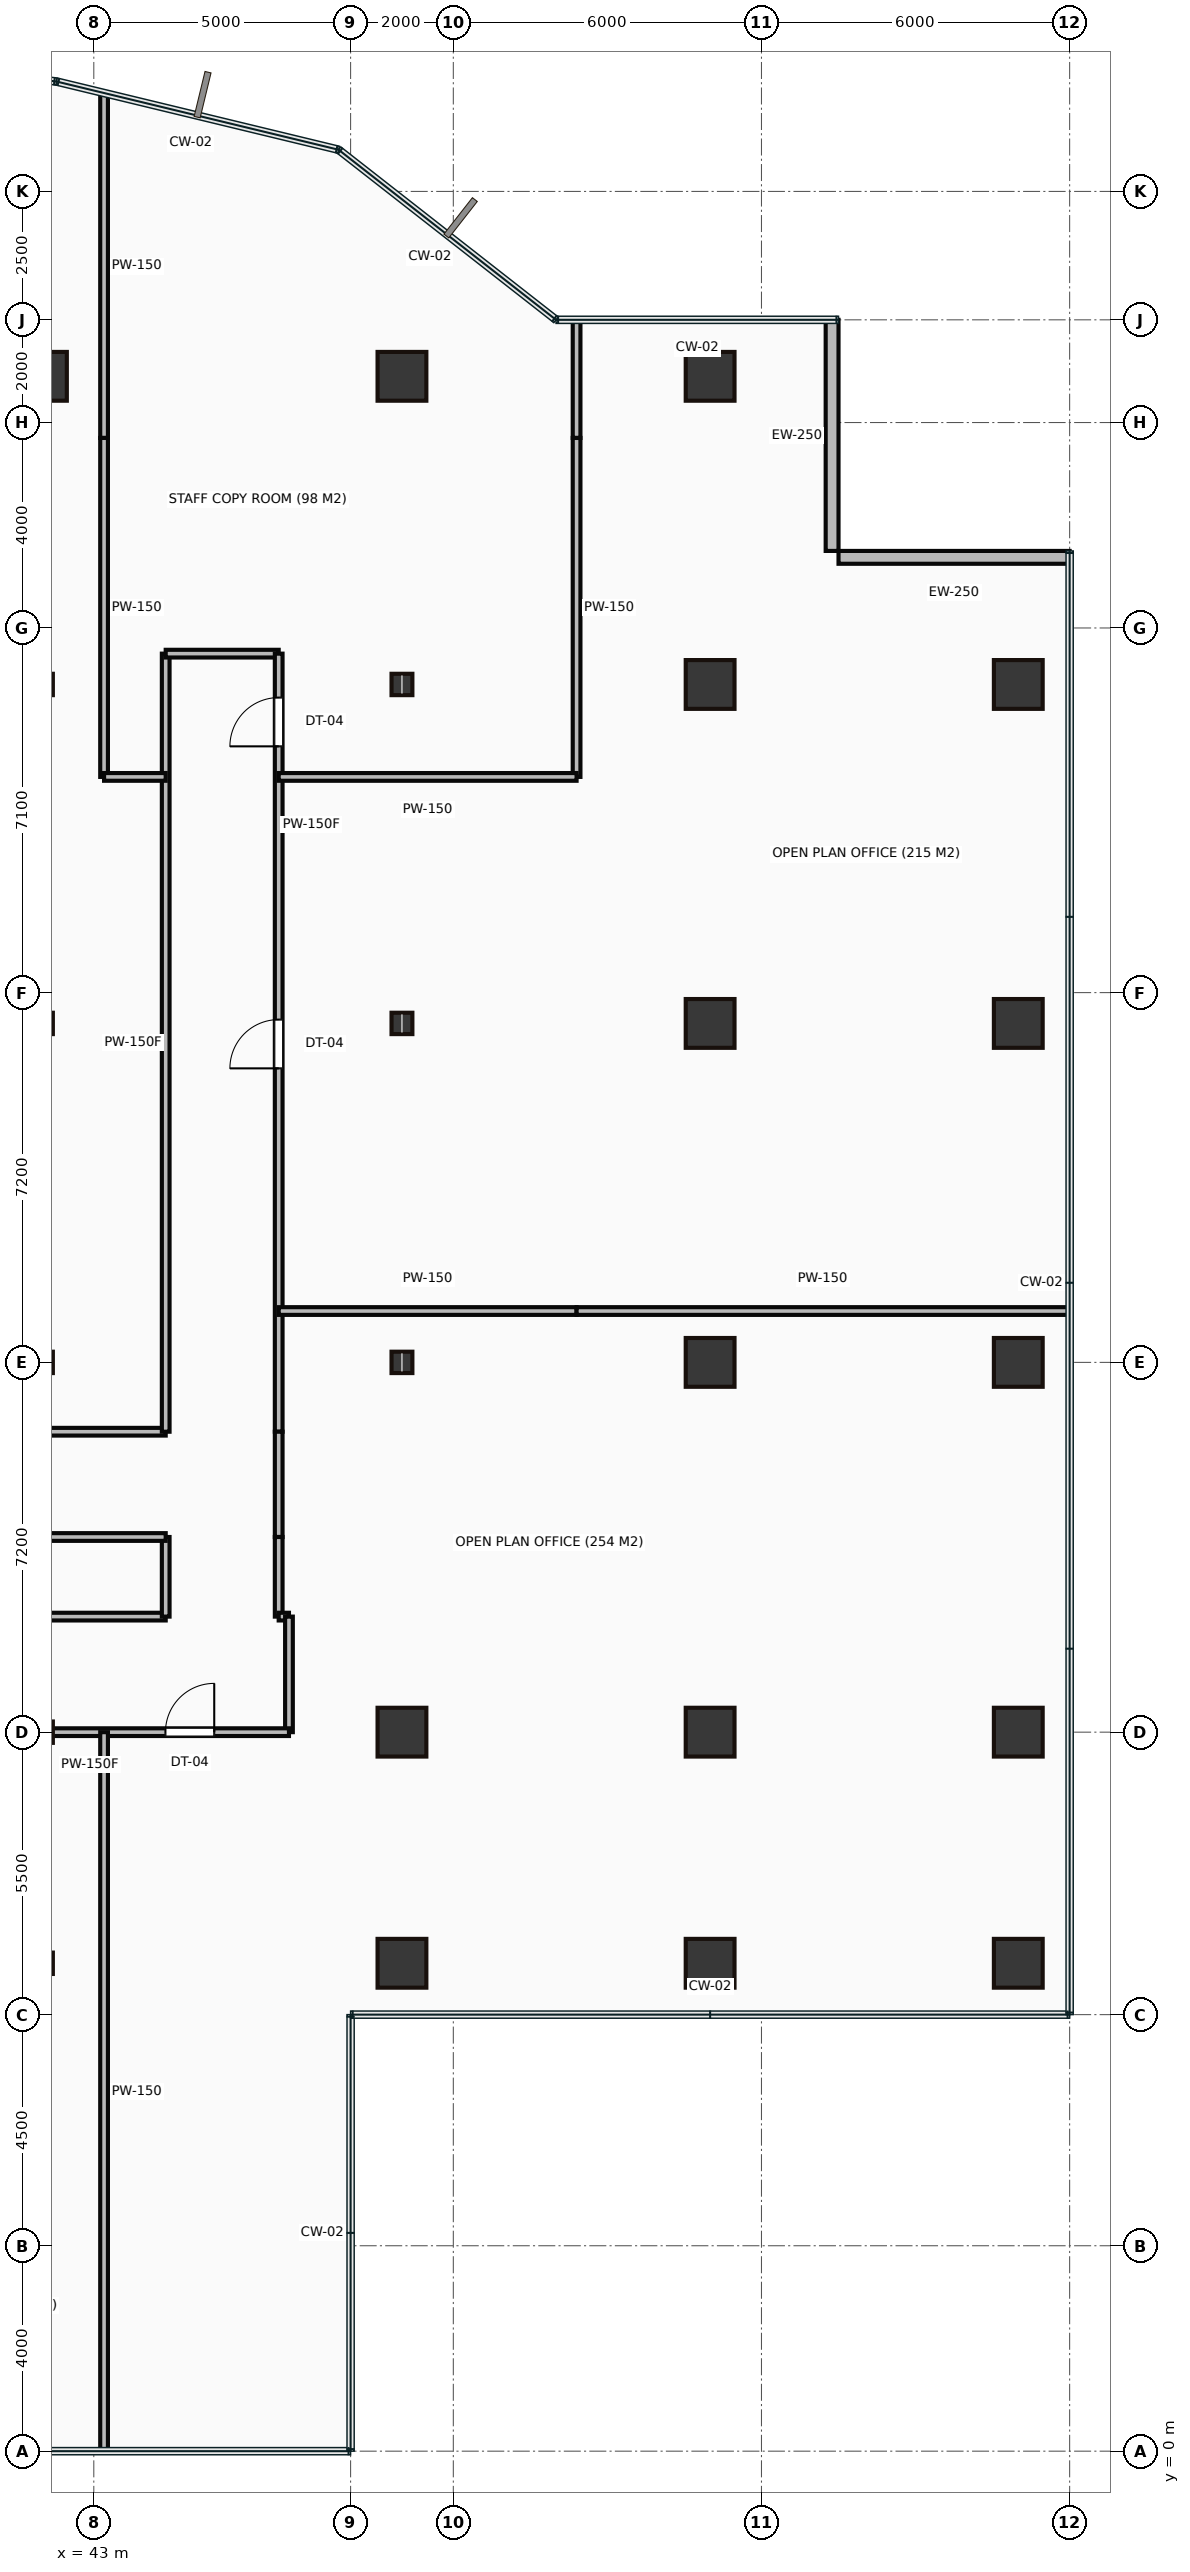
"""IFC4 building model, lengths in metres.
Left out: names, types, materials, properties, quantities, classifications, styles, units other than length and angle.
Written with IfcOpenShell. Run it as: python <this file> out.ifc"""

import sys

from ifc_helpers import new_model, si_unit, direction, frame, frame_2d, origin, origin_2d, place, context, subcontext, project, spatial, rectangle, hollow_rectangle, i_section, extrude, source, transform, mapped, element, fill, save


model = new_model("IFC4")
c1 = context("Model", 3, precision=1e-05, world=origin(), true_north=direction((0.0, 1.0)))
c2 = subcontext(c1, "Body", "Model", "MODEL_VIEW")
j1 = project(units=[si_unit("LENGTHUNIT", "METRE"), si_unit("PLANEANGLEUNIT", "RADIAN")], contexts=[c1])
p1 = place(None, origin())
s1 = spatial("IfcSite", under=j1, at=p1, CompositionType="ELEMENT")
p2 = place(p1, origin())
s2 = spatial("IfcBuilding", under=s1, at=p2, CompositionType="ELEMENT")
p3 = place(p2, frame((0.0, 0.0, 39.8)))
s3 = spatial("IfcBuildingStorey", under=s2, at=p3, CompositionType="ELEMENT", Elevation=39.8)
m1 = source(origin(), c2, "Body", "SweptSolid", [
    extrude(i_section(OverallWidth=0.406, OverallDepth=0.416, WebThickness=0.03, FlangeThickness=0.048, at=origin_2d()), origin(), (0.0, 0.0, 1.0), 3.65),
])
for number, where, z_axis, x_axis in (
    (1, (42.0, 9.5, 0.0), (0.0, 0.0, 1.0), (1.0, 0.0, 0.0)),
    (2, (42.0, 14.0, 0.0), (0.0, 0.0, 1.0), (1.0, 0.0, 0.0)),
    (3, (42.0, 21.2, 0.0), (0.0, 0.0, 1.0), (1.0, 0.0, 0.0)),
    (4, (42.0, 27.8, 0.0), (0.0, 0.0, 1.0), (1.0, 0.0, 0.0)),
    (5, (42.0, 34.4, 0.0), (0.0, 0.0, 1.0), (1.0, 0.0, 0.0)),
):
    element("IfcColumn", number, at=place(p3, frame(where, z_axis=z_axis, x_axis=x_axis)), inside=s3, PredefinedType="COLUMN", context=c2, shape_type="MappedRepresentation", body=[
        mapped(m1, transform((0.0, 0.0, 0.0))),
    ])
m2 = source(origin(), c2, "Body", "SweptSolid", [
    extrude(hollow_rectangle(XDim=0.95, YDim=0.95, WallThickness=0.045, at=origin_2d()), origin(), (0.0, 0.0, 1.0), 3.65),
])
for number, where, z_axis, x_axis in (
    (6, (42.0, 40.4, 0.0), (0.0, 0.0, 1.0), (1.0, 0.0, 0.0)),
    (7, (49.0, 9.5, 0.0), (0.0, 0.0, 1.0), (1.0, 0.0, 0.0)),
    (8, (49.0, 14.0, 0.0), (0.0, 0.0, 1.0), (1.0, 0.0, 0.0)),
):
    element("IfcColumn", number, at=place(p3, frame(where, z_axis=z_axis, x_axis=x_axis)), inside=s3, PredefinedType="COLUMN", context=c2, shape_type="MappedRepresentation", body=[
        mapped(m2, transform((0.0, 0.0, 0.0))),
    ])
for number, where, z_axis, x_axis in (
    (9, (49.0, 21.2, 0.0), (0.0, 0.0, 1.0), (1.0, 0.0, 0.0)),
    (10, (49.0, 27.8, 0.0), (0.0, 0.0, 1.0), (1.0, 0.0, 0.0)),
    (11, (49.0, 34.4, 0.0), (0.0, 0.0, 1.0), (1.0, 0.0, 0.0)),
):
    element("IfcColumn", number, at=place(p3, frame(where, z_axis=z_axis, x_axis=x_axis)), inside=s3, PredefinedType="COLUMN", context=c2, shape_type="MappedRepresentation", body=[
        mapped(m1, transform((0.0, 0.0, 0.0))),
    ])
for number, where, z_axis, x_axis in (
    (12, (49.0, 40.4, 0.0), (0.0, 0.0, 1.0), (1.0, 0.0, 0.0)),
    (13, (55.0, 9.5, 0.0), (0.0, 0.0, 1.0), (1.0, 0.0, 0.0)),
    (14, (55.0, 14.0, 0.0), (0.0, 0.0, 1.0), (1.0, 0.0, 0.0)),
    (15, (55.0, 21.2, 0.0), (0.0, 0.0, 1.0), (1.0, 0.0, 0.0)),
    (16, (55.0, 27.8, 0.0), (0.0, 0.0, 1.0), (1.0, 0.0, 0.0)),
    (17, (55.0, 34.4, 0.0), (0.0, 0.0, 1.0), (1.0, 0.0, 0.0)),
    (18, (55.0, 40.4, 0.0), (0.0, 0.0, 1.0), (1.0, 0.0, 0.0)),
    (19, (61.0, 9.5, 0.0), (0.0, 0.0, 1.0), (1.0, 0.0, 0.0)),
    (20, (61.0, 14.0, 0.0), (0.0, 0.0, 1.0), (1.0, 0.0, 0.0)),
    (21, (61.0, 21.2, 0.0), (0.0, 0.0, 1.0), (1.0, 0.0, 0.0)),
    (22, (61.0, 27.8, 0.0), (0.0, 0.0, 1.0), (1.0, 0.0, 0.0)),
    (23, (61.0, 34.4, 0.0), (0.0, 0.0, 1.0), (1.0, 0.0, 0.0)),
):
    element("IfcColumn", number, at=place(p3, frame(where, z_axis=z_axis, x_axis=x_axis)), inside=s3, PredefinedType="COLUMN", context=c2, shape_type="MappedRepresentation", body=[
        mapped(m2, transform((0.0, 0.0, 0.0))),
    ])
m3 = source(origin(), c2, "Body", "SweptSolid", [
    extrude(rectangle(XDim=4.5, YDim=0.25, at=frame_2d((2.25, 0.0))), origin(), (0.0, 0.0, 1.0), 3.4),
])
for number, where, z_axis, x_axis in (
    (24, (62.0, 36.875, 0.0), (0.0, 0.0, 1.0), (-1.0, 0.0, 0.0)),
    (25, (57.375, 37.0, 0.0), (0.0, 0.0, 1.0), (0.0, 1.0, 0.0)),
):
    element("IfcWall", number, at=place(p3, frame(where, z_axis=z_axis, x_axis=x_axis)), inside=s3, PredefinedType="STANDARD", context=c2, shape_type="MappedRepresentation", body=[
        mapped(m3, transform((0.0, 0.0, 0.0))),
    ])
m4 = source(origin(), c2, "Body", "SweptSolid", [
    extrude(rectangle(XDim=25.4, YDim=0.15, at=frame_2d((12.7, 0.0))), origin(), (0.0, 0.0, 1.0), 3.4),
])
p4 = place(p3, frame((19.0, 19.85, 0.0), z_axis=(0.0, 0.0, 1.0), x_axis=(1.0, 0.0, 0.0)))
e26 = element("IfcWall", 26, at=p4, inside=s3, PredefinedType="PARTITIONING", context=c2, shape_type="MappedRepresentation", body=[
    mapped(m4, transform((0.0, 0.0, 0.0))),
])
p5 = place(p4, frame((12.225, 0.0, 0.0)))
e27 = element("IfcOpeningElement", 27, at=p5, cuts=e26, PredefinedType="OPENING", context=c2, shape_type="SweptSolid", body=[
    extrude(rectangle(XDim=0.95, YDim=2.15, at=frame_2d((0.475, 1.075))), frame((0.0, 0.085, 0.0), z_axis=(0.0, -1.0, 0.0), x_axis=(1.0, 0.0, 0.0)), (0.0, 0.0, 1.0), 0.17),
])
m5 = source(origin(), c2, "Body", "SweptSolid", [
    extrude(rectangle(XDim=15.15, YDim=0.15, at=frame_2d((7.575, 0.0))), origin(), (0.0, 0.0, 1.0), 3.4),
])
p6 = place(p3, frame((44.4, 19.85, 0.0), z_axis=(0.0, 0.0, 1.0), x_axis=(0.0, 1.0, 0.0)))
e28 = element("IfcWall", 28, at=p6, inside=s3, PredefinedType="PARTITIONING", context=c2, shape_type="MappedRepresentation", body=[
    mapped(m5, transform((0.0, 0.0, 0.0))),
])
m6 = source(origin(), c2, "Body", "SweptSolid", [
    extrude(rectangle(XDim=2.2, YDim=0.15, at=frame_2d((1.1, 0.0))), origin(), (0.0, 0.0, 1.0), 3.4),
])
p7 = place(p3, frame((44.4, 35.0, 0.0), z_axis=(0.0, 0.0, 1.0), x_axis=(1.0, 0.0, 0.0)))
e29 = element("IfcWall", 29, at=p7, inside=s3, PredefinedType="PARTITIONING", context=c2, shape_type="MappedRepresentation", body=[
    mapped(m6, transform((0.0, 0.0, 0.0))),
])
p8 = place(p3, frame((46.6, 35.0, 0.0), z_axis=(0.0, 0.0, 1.0), x_axis=(0.0, -1.0, 0.0)))
e30 = element("IfcWall", 30, at=p8, inside=s3, PredefinedType="PARTITIONING", context=c2, shape_type="MappedRepresentation", body=[
    mapped(m5, transform((0.0, 0.0, 0.0))),
])
p9 = place(p8, frame((0.855, 0.0, 0.0)))
e31 = element("IfcOpeningElement", 31, at=p9, cuts=e30, PredefinedType="OPENING", context=c2, shape_type="SweptSolid", body=[
    extrude(rectangle(XDim=0.95, YDim=2.15, at=frame_2d((0.475, 1.075))), frame((0.0, 0.085, 0.0), z_axis=(0.0, -1.0, 0.0), x_axis=(1.0, 0.0, 0.0)), (0.0, 0.0, 1.0), 0.17),
])
p10 = place(p8, frame((7.125, 0.0, 0.0)))
e32 = element("IfcOpeningElement", 32, at=p10, cuts=e30, PredefinedType="OPENING", context=c2, shape_type="SweptSolid", body=[
    extrude(rectangle(XDim=0.95, YDim=2.15, at=frame_2d((0.475, 1.075))), frame((0.0, 0.085, 0.0), z_axis=(0.0, -1.0, 0.0), x_axis=(1.0, 0.0, 0.0)), (0.0, 0.0, 1.0), 0.17),
])
m7 = source(origin(), c2, "Body", "SweptSolid", [
    extrude(rectangle(XDim=2.05, YDim=0.15, at=frame_2d((1.025, 0.0))), origin(), (0.0, 0.0, 1.0), 3.4),
])
p11 = place(p3, frame((46.6, 19.85, 0.0), z_axis=(0.0, 0.0, 1.0), x_axis=(0.0, -1.0, 0.0)))
e33 = element("IfcWall", 33, at=p11, inside=s3, PredefinedType="PARTITIONING", context=c2, shape_type="MappedRepresentation", body=[
    mapped(m7, transform((0.0, 0.0, 0.0))),
])
m8 = source(origin(), c2, "Body", "SweptSolid", [
    extrude(rectangle(XDim=1.55, YDim=0.15, at=frame_2d((0.775, 0.0))), origin(), (0.0, 0.0, 1.0), 3.4),
])
p12 = place(p3, frame((46.6, 17.8, 0.0), z_axis=(0.0, 0.0, 1.0), x_axis=(0.0, -1.0, 0.0)))
e34 = element("IfcWall", 34, at=p12, inside=s3, PredefinedType="PARTITIONING", context=c2, shape_type="MappedRepresentation", body=[
    mapped(m8, transform((0.0, 0.0, 0.0))),
])
m9 = source(origin(), c2, "Body", "SweptSolid", [
    extrude(rectangle(XDim=0.2, YDim=0.15, at=frame_2d((0.1, 0.0))), origin(), (0.0, 0.0, 1.0), 3.4),
])
p13 = place(p3, frame((46.6, 16.25, 0.0), z_axis=(0.0, 0.0, 1.0), x_axis=(1.0, 0.0, 0.0)))
e35 = element("IfcWall", 35, at=p13, inside=s3, PredefinedType="PARTITIONING", context=c2, shape_type="MappedRepresentation", body=[
    mapped(m9, transform((0.0, 0.0, 0.0))),
])
m10 = source(origin(), c2, "Body", "SweptSolid", [
    extrude(rectangle(XDim=2.25, YDim=0.15, at=frame_2d((1.125, 0.0))), origin(), (0.0, 0.0, 1.0), 3.4),
])
p14 = place(p3, frame((46.8, 16.25, 0.0), z_axis=(0.0, 0.0, 1.0), x_axis=(0.0, -1.0, 0.0)))
e36 = element("IfcWall", 36, at=p14, inside=s3, PredefinedType="PARTITIONING", context=c2, shape_type="MappedRepresentation", body=[
    mapped(m10, transform((0.0, 0.0, 0.0))),
])
m11 = source(origin(), c2, "Body", "SweptSolid", [
    extrude(rectangle(XDim=7.75, YDim=0.15, at=frame_2d((3.875, 0.0))), origin(), (0.0, 0.0, 1.0), 2.625),
])
p15 = place(p3, frame((46.8, 14.0, 0.0), z_axis=(0.0, 0.0, 1.0), x_axis=(-1.0, 0.0, 0.0)))
e37 = element("IfcWall", 37, at=p15, inside=s3, PredefinedType="PARTITIONING", context=c2, shape_type="MappedRepresentation", body=[
    mapped(m11, transform((0.0, 0.0, 0.0))),
])
p16 = place(p15, frame((5.96, 0.0, 0.0)))
e38 = element("IfcOpeningElement", 38, at=p16, cuts=e37, PredefinedType="OPENING", context=c2, shape_type="SweptSolid", body=[
    extrude(rectangle(XDim=0.95, YDim=2.15, at=frame_2d((0.475, 1.075))), frame((0.0, 0.085, 0.0), z_axis=(0.0, -1.0, 0.0), x_axis=(1.0, 0.0, 0.0)), (0.0, 0.0, 1.0), 0.17),
])
p17 = place(p15, frame((1.455, 0.0, 0.0)))
e39 = element("IfcOpeningElement", 39, at=p17, cuts=e37, PredefinedType="OPENING", context=c2, shape_type="SweptSolid", body=[
    extrude(rectangle(XDim=0.95, YDim=2.15, at=frame_2d((0.475, 1.075))), frame((0.0, 0.085, 0.0), z_axis=(0.0, -1.0, 0.0), x_axis=(1.0, 0.0, 0.0)), (0.0, 0.0, 1.0), 0.17),
])
p18 = place(p3, frame((19.0, 16.25, 0.0), z_axis=(0.0, 0.0, 1.0), x_axis=(1.0, 0.0, 0.0)))
e40 = element("IfcWall", 40, at=p18, inside=s3, PredefinedType="PARTITIONING", context=c2, shape_type="MappedRepresentation", body=[
    mapped(m4, transform((0.0, 0.0, 0.0))),
])
p19 = place(p18, frame((12.225, 0.0, 0.0)))
e41 = element("IfcOpeningElement", 41, at=p19, cuts=e40, PredefinedType="OPENING", context=c2, shape_type="SweptSolid", body=[
    extrude(rectangle(XDim=0.95, YDim=2.15, at=frame_2d((0.475, 1.075))), frame((0.0, 0.085, 0.0), z_axis=(0.0, -1.0, 0.0), x_axis=(1.0, 0.0, 0.0)), (0.0, 0.0, 1.0), 0.17),
])
p20 = place(p3, frame((44.4, 16.25, 0.0), z_axis=(0.0, 0.0, 1.0), x_axis=(0.0, 1.0, 0.0)))
e42 = element("IfcWall", 42, at=p20, inside=s3, PredefinedType="PARTITIONING", context=c2, shape_type="MappedRepresentation", body=[
    mapped(m8, transform((0.0, 0.0, 0.0))),
])
p21 = place(p3, frame((44.4, 17.8, 0.0), z_axis=(0.0, 0.0, 1.0), x_axis=(-1.0, 0.0, 0.0)))
e43 = element("IfcWall", 43, at=p21, inside=s3, PredefinedType="PARTITIONING", context=c2, shape_type="MappedRepresentation", body=[
    mapped(m4, transform((0.0, 0.0, 0.0))),
])
m12 = source(origin(), c2, "Body", "SweptSolid", [
    extrude(rectangle(XDim=13.98, YDim=0.15, at=frame_2d((6.99, 0.0))), origin(), (0.0, 0.0, 1.0), 3.4),
])
p22 = place(p3, frame((43.2, 14.0, 0.0), z_axis=(0.0, 0.0, 1.0), x_axis=(0.0, -1.0, 0.0)))
e44 = element("IfcWall", 44, at=p22, inside=s3, PredefinedType="PARTITIONING", context=c2, shape_type="MappedRepresentation", body=[
    mapped(m12, transform((0.0, 0.0, 0.0))),
])
m13 = source(origin(), c2, "Body", "SweptSolid", [
    extrude(rectangle(XDim=6.696, YDim=0.15, at=frame_2d((3.348, 0.0))), origin(), (0.0, 0.0, 1.0), 3.4),
])
p23 = place(p3, frame((43.2, 45.896, 0.0), z_axis=(0.0, 0.0, 1.0), x_axis=(0.0, -1.0, 0.0)))
e45 = element("IfcWall", 45, at=p23, inside=s3, PredefinedType="PARTITIONING", context=c2, shape_type="MappedRepresentation", body=[
    mapped(m13, transform((0.0, 0.0, 0.0))),
])
m14 = source(origin(), c2, "Body", "SweptSolid", [
    extrude(rectangle(XDim=6.6, YDim=0.15, at=frame_2d((3.3, 0.0))), origin(), (0.0, 0.0, 1.0), 3.4),
])
p24 = place(p3, frame((43.2, 39.2, 0.0), z_axis=(0.0, 0.0, 1.0), x_axis=(0.0, -1.0, 0.0)))
e46 = element("IfcWall", 46, at=p24, inside=s3, PredefinedType="PARTITIONING", context=c2, shape_type="MappedRepresentation", body=[
    mapped(m14, transform((0.0, 0.0, 0.0))),
])
m15 = source(origin(), c2, "Body", "SweptSolid", [
    extrude(rectangle(XDim=1.2, YDim=0.15, at=frame_2d((0.6, 0.0))), origin(), (0.0, 0.0, 1.0), 3.4),
])
p25 = place(p3, frame((43.2, 32.6, 0.0), z_axis=(0.0, 0.0, 1.0), x_axis=(1.0, 0.0, 0.0)))
e47 = element("IfcWall", 47, at=p25, inside=s3, PredefinedType="PARTITIONING", context=c2, shape_type="MappedRepresentation", body=[
    mapped(m15, transform((0.0, 0.0, 0.0))),
])
m16 = source(origin(), c2, "Body", "SweptSolid", [
    extrude(rectangle(XDim=5.8, YDim=0.15, at=frame_2d((2.9, 0.0))), origin(), (0.0, 0.0, 1.0), 3.4),
])
p26 = place(p3, frame((46.6, 22.2, 0.0), z_axis=(0.0, 0.0, 1.0), x_axis=(1.0, 0.0, 0.0)))
e48 = element("IfcWall", 48, at=p26, inside=s3, PredefinedType="PARTITIONING", context=c2, shape_type="MappedRepresentation", body=[
    mapped(m16, transform((0.0, 0.0, 0.0))),
])
m17 = source(origin(), c2, "Body", "SweptSolid", [
    extrude(rectangle(XDim=9.58, YDim=0.15, at=frame_2d((4.79, 0.0))), origin(), (0.0, 0.0, 1.0), 3.4),
])
p27 = place(p3, frame((52.4, 22.2, 0.0), z_axis=(0.0, 0.0, 1.0), x_axis=(1.0, 0.0, 0.0)))
e49 = element("IfcWall", 49, at=p27, inside=s3, PredefinedType="PARTITIONING", context=c2, shape_type="MappedRepresentation", body=[
    mapped(m17, transform((0.0, 0.0, 0.0))),
])
m18 = source(origin(), c2, "Body", "SweptSolid", [
    extrude(rectangle(XDim=2.28, YDim=0.15, at=frame_2d((1.14, 0.0))), origin(), (0.0, 0.0, 1.0), 3.4),
])
p28 = place(p3, frame((52.4, 41.48, 0.0), z_axis=(0.0, 0.0, 1.0), x_axis=(0.0, -1.0, 0.0)))
e50 = element("IfcWall", 50, at=p28, inside=s3, PredefinedType="PARTITIONING", context=c2, shape_type="MappedRepresentation", body=[
    mapped(m18, transform((0.0, 0.0, 0.0))),
])
p29 = place(p3, frame((52.4, 39.2, 0.0), z_axis=(0.0, 0.0, 1.0), x_axis=(0.0, -1.0, 0.0)))
e51 = element("IfcWall", 51, at=p29, inside=s3, PredefinedType="PARTITIONING", context=c2, shape_type="MappedRepresentation", body=[
    mapped(m14, transform((0.0, 0.0, 0.0))),
])
p30 = place(p3, frame((52.4, 32.6, 0.0), z_axis=(0.0, 0.0, 1.0), x_axis=(-1.0, 0.0, 0.0)))
e52 = element("IfcWall", 52, at=p30, inside=s3, PredefinedType="PARTITIONING", context=c2, shape_type="MappedRepresentation", body=[
    mapped(m16, transform((0.0, 0.0, 0.0))),
])
m19 = source(origin(), c2, "Body", "SweptSolid", [
    extrude(rectangle(XDim=0.95, YDim=2.15, at=frame_2d((0.475, 1.075))), frame((0.0, 0.025, 0.0), z_axis=(0.0, -1.0, 0.0), x_axis=(1.0, 0.0, 0.0)), (0.0, 0.0, 1.0), 0.05),
])
p31 = place(p9, origin())
e53 = element("IfcDoor", 53, at=p31, inside=s3, OperationType="SINGLE_SWING_RIGHT", PredefinedType="DOOR", context=c2, shape_type="MappedRepresentation", body=[
    mapped(m19, transform((0.0, 0.0, 0.0))),
])
fill(e31, e53)
p32 = place(p17, origin())
e54 = element("IfcDoor", 54, at=p32, inside=s3, OperationType="SINGLE_SWING_LEFT", PredefinedType="DOOR", context=c2, shape_type="MappedRepresentation", body=[
    mapped(m19, transform((0.0, 0.0, 0.0))),
])
fill(e39, e54)
p33 = place(p10, origin())
e55 = element("IfcDoor", 55, at=p33, inside=s3, OperationType="SINGLE_SWING_RIGHT", PredefinedType="DOOR", context=c2, shape_type="MappedRepresentation", body=[
    mapped(m19, transform((0.0, 0.0, 0.0))),
])
fill(e32, e55)
save(model, sys.argv[1])
